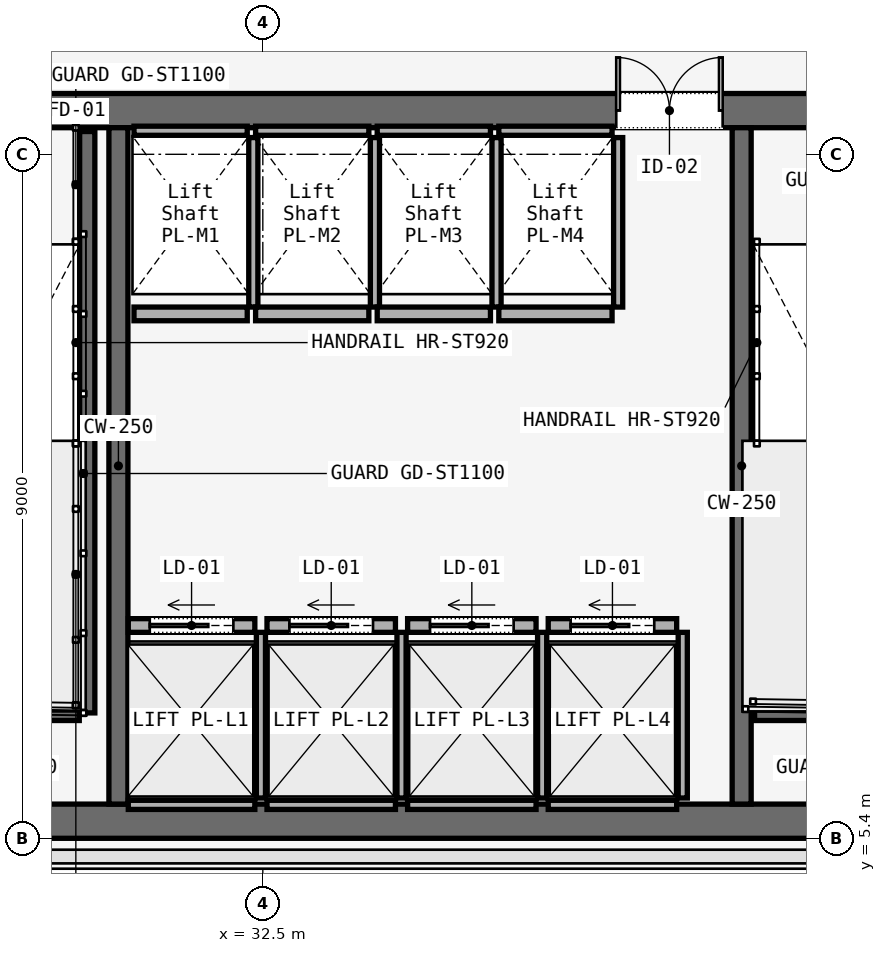
"""IFC4 building model, lengths in metres.
Left out: names, types, materials, properties, quantities, classifications, styles, units other than length and angle.
Written with IfcOpenShell. Run it as: python <this file> out.ifc"""

import sys

from ifc_helpers import new_model, si_unit, direction, frame, frame_2d, origin, place, context, subcontext, project, spatial, rectangle, extrude, element, fill, save


model = new_model("IFC4")
c1 = context("Model", 3, precision=1e-05, world=origin(), true_north=direction((0.0, 1.0)))
c2 = subcontext(c1, "Body", "Model", "MODEL_VIEW")
j1 = project(units=[si_unit("LENGTHUNIT", "METRE"), si_unit("PLANEANGLEUNIT", "RADIAN")], contexts=[c1])
p1 = place(None, origin())
s1 = spatial("IfcSite", under=j1, at=p1, CompositionType="ELEMENT")
p2 = place(p1, origin())
s2 = spatial("IfcBuilding", under=s1, at=p2, CompositionType="ELEMENT")
p3 = place(p2, frame((0.0, 0.0, 77.8)))
s3 = spatial("IfcBuildingStorey", under=s2, at=p3, CompositionType="ELEMENT", Elevation=77.8)
p4 = place(p3, frame((26.45, 14.975, 0.0), z_axis=(0.0, 0.0, 1.0), x_axis=(1.0, 0.0, 0.0)))
e1 = element("IfcWall", 1, at=p4, inside=s3, PredefinedType="SOLIDWALL", context=c2, shape_type="SweptSolid", body=[
    extrude(rectangle(XDim=31.1, YDim=0.45, at=frame_2d((15.55, 0.0))), origin(), (0.0, 0.0, 1.0), 3.58),
])
p5 = place(p4, frame((1.65, 0.0, 0.0)))
e2 = element("IfcOpeningElement", 2, at=p5, cuts=e1, PredefinedType="OPENING", context=c2, shape_type="SweptSolid", body=[
    extrude(rectangle(XDim=1.1, YDim=2.2, at=frame_2d((0.55, 1.1))), frame((0.0, 0.225, 0.0), z_axis=(0.0, -1.0, 0.0), x_axis=(1.0, 0.0, 0.0)), (0.0, 0.0, 1.0), 0.45),
])
p6 = place(p4, frame((13.65, 0.0, 0.0)))
e3 = element("IfcOpeningElement", 3, at=p6, cuts=e1, PredefinedType="OPENING", context=c2, shape_type="SweptSolid", body=[
    extrude(rectangle(XDim=1.1, YDim=2.2, at=frame_2d((0.55, 1.1))), frame((0.0, 0.225, 0.0), z_axis=(0.0, -1.0, 0.0), x_axis=(1.0, 0.0, 0.0)), (0.0, 0.0, 1.0), 0.45),
])
p7 = place(p4, frame((25.55, 0.0, 0.0)))
e4 = element("IfcOpeningElement", 4, at=p7, cuts=e1, PredefinedType="OPENING", context=c2, shape_type="SweptSolid", body=[
    extrude(rectangle(XDim=1.1, YDim=2.2, at=frame_2d((0.55, 1.1))), frame((0.0, 0.225, 0.0), z_axis=(0.0, -1.0, 0.0), x_axis=(1.0, 0.0, 0.0)), (0.0, 0.0, 1.0), 0.45),
])
p8 = place(p4, frame((10.7, 0.0, 0.0)))
e5 = element("IfcOpeningElement", 5, at=p8, cuts=e1, PredefinedType="OPENING", context=c2, shape_type="SweptSolid", body=[
    extrude(rectangle(XDim=1.4, YDim=2.2, at=frame_2d((0.7, 1.1))), frame((0.0, 0.225, 0.0), z_axis=(0.0, -1.0, 0.0), x_axis=(1.0, 0.0, 0.0)), (0.0, 0.0, 1.0), 0.45),
])
p9 = place(p4, frame((19.35, 0.0, 0.0)))
e6 = element("IfcOpeningElement", 6, at=p9, cuts=e1, PredefinedType="OPENING", context=c2, shape_type="SweptSolid", body=[
    extrude(rectangle(XDim=1.1, YDim=2.2, at=frame_2d((0.55, 1.1))), frame((0.0, 0.225, 0.0), z_axis=(0.0, -1.0, 0.0), x_axis=(1.0, 0.0, 0.0)), (0.0, 0.0, 1.0), 0.45),
])
p10 = place(p4, frame((21.4, 0.0, 0.0)))
e7 = element("IfcOpeningElement", 7, at=p10, cuts=e1, PredefinedType="OPENING", context=c2, shape_type="SweptSolid", body=[
    extrude(rectangle(XDim=0.9, YDim=2.1, at=frame_2d((0.45, 1.05))), frame((0.0, 0.225, 0.0), z_axis=(0.0, -1.0, 0.0), x_axis=(1.0, 0.0, 0.0)), (0.0, 0.0, 1.0), 0.45),
])
p11 = place(p4, frame((23.35, 0.0, 0.0)))
e8 = element("IfcOpeningElement", 8, at=p11, cuts=e1, PredefinedType="OPENING", context=c2, shape_type="SweptSolid", body=[
    extrude(rectangle(XDim=1.3, YDim=2.3, at=frame_2d((0.65, 1.15))), frame((0.0, 0.225, 0.0), z_axis=(0.0, -1.0, 0.0), x_axis=(1.0, 0.0, 0.0)), (0.0, 0.0, 1.0), 0.45),
])
p12 = place(p3, frame((26.45, 5.625, 0.0), z_axis=(0.0, 0.0, 1.0), x_axis=(1.0, 0.0, 0.0)))
e9 = element("IfcWall", 9, at=p12, inside=s3, PredefinedType="SOLIDWALL", context=c2, shape_type="SweptSolid", body=[
    extrude(rectangle(XDim=31.1, YDim=0.45, at=frame_2d((15.55, 0.0))), origin(), (0.0, 0.0, 1.0), 3.58),
])
for number, where, z_axis, x_axis in (
    (10, (30.6, 5.85, 0.0), (0.0, 0.0, 1.0), (0.0, 1.0, 0.0)),
    (11, (38.8, 5.85, 0.0), (0.0, 0.0, 1.0), (0.0, 1.0, 0.0)),
):
    element("IfcWall", number, at=place(p3, frame(where, z_axis=z_axis, x_axis=x_axis)), inside=s3, PredefinedType="SOLIDWALL", context=c2, shape_type="SweptSolid", body=[
        extrude(rectangle(XDim=8.9, YDim=0.25, at=frame_2d((4.45, 0.0))), origin(), (0.0, 0.0, 1.0), 3.58),
    ])
p13 = place(p3, frame((30.19, 14.7, 0.0), z_axis=(0.0, 0.0, 1.0), x_axis=(0.0, -1.0, 0.0)))
e12 = element("IfcWall", 12, at=p13, inside=s3, PredefinedType="SOLIDWALL", context=c2, shape_type="SweptSolid", body=[
    extrude(rectangle(XDim=7.65, YDim=0.2, at=frame_2d((3.825, 0.0))), origin(), (0.0, 0.0, 1.0), 3.8),
])
for number, where, z_axis, x_axis in (
    (13, (26.97, 7.05, 0.0), (0.0, 0.0, 1.0), (1.0, 0.0, 0.0)),
    (14, (38.97, 7.05, 0.0), (0.0, 0.0, 1.0), (1.0, 0.0, 0.0)),
):
    element("IfcWall", number, at=place(p3, frame(where, z_axis=z_axis, x_axis=x_axis)), inside=s3, PredefinedType="SOLIDWALL", context=c2, shape_type="SweptSolid", body=[
        extrude(rectangle(XDim=3.115, YDim=0.2, at=frame_2d((1.558, 0.0))), origin(), (0.0, 0.0, 1.0), 3.8),
    ])
p14 = place(p3, frame((30.73, 8.2, 0.0), z_axis=(0.0, 0.0, 1.0), x_axis=(1.0, 0.0, 0.0)))
e15 = element("IfcWall", 15, at=p14, inside=s3, PredefinedType="SOLIDWALL", context=c2, shape_type="SweptSolid", body=[
    extrude(rectangle(XDim=1.665, YDim=0.18, at=frame_2d((0.833, 0.0))), origin(), (0.0, 0.0, 1.0), 2.95),
])
p15 = place(p14, frame((0.282, 0.0, 0.0)))
e16 = element("IfcOpeningElement", 16, at=p15, cuts=e15, PredefinedType="OPENING", context=c2, shape_type="SweptSolid", body=[
    extrude(rectangle(XDim=1.1, YDim=2.2, at=frame_2d((0.55, 1.1))), frame((0.0, 0.09, 0.0), z_axis=(0.0, -1.0, 0.0), x_axis=(1.0, 0.0, 0.0)), (0.0, 0.0, 1.0), 0.18),
])
p16 = place(p3, frame((30.73, 5.84, 0.0), z_axis=(0.0, 0.0, 1.0), x_axis=(1.0, 0.0, 0.0)))
e17 = element("IfcWall", 17, at=p16, inside=s3, PredefinedType="SOLIDWALL", context=c2, shape_type="SweptSolid", body=[
    extrude(rectangle(XDim=1.665, YDim=0.12, at=frame_2d((0.833, 0.0))), origin(), (0.0, 0.0, 1.0), 2.95),
])
p17 = place(p3, frame((32.475, 5.93, 0.0), z_axis=(0.0, 0.0, 1.0), x_axis=(0.0, 1.0, 0.0)))
e18 = element("IfcWall", 18, at=p17, inside=s3, PredefinedType="SOLIDWALL", context=c2, shape_type="SweptSolid", body=[
    extrude(rectangle(XDim=2.18, YDim=0.12, at=frame_2d((1.09, 0.0))), origin(), (0.0, 0.0, 1.0), 2.95),
])
p18 = place(p3, frame((32.555, 8.2, 0.0), z_axis=(0.0, 0.0, 1.0), x_axis=(1.0, 0.0, 0.0)))
e19 = element("IfcWall", 19, at=p18, inside=s3, PredefinedType="SOLIDWALL", context=c2, shape_type="SweptSolid", body=[
    extrude(rectangle(XDim=1.69, YDim=0.18, at=frame_2d((0.845, 0.0))), origin(), (0.0, 0.0, 1.0), 2.95),
])
p19 = place(p18, frame((0.295, 0.0, 0.0)))
e20 = element("IfcOpeningElement", 20, at=p19, cuts=e19, PredefinedType="OPENING", context=c2, shape_type="SweptSolid", body=[
    extrude(rectangle(XDim=1.1, YDim=2.2, at=frame_2d((0.55, 1.1))), frame((0.0, 0.09, 0.0), z_axis=(0.0, -1.0, 0.0), x_axis=(1.0, 0.0, 0.0)), (0.0, 0.0, 1.0), 0.18),
])
p20 = place(p3, frame((32.555, 5.84, 0.0), z_axis=(0.0, 0.0, 1.0), x_axis=(1.0, 0.0, 0.0)))
e21 = element("IfcWall", 21, at=p20, inside=s3, PredefinedType="SOLIDWALL", context=c2, shape_type="SweptSolid", body=[
    extrude(rectangle(XDim=1.69, YDim=0.12, at=frame_2d((0.845, 0.0))), origin(), (0.0, 0.0, 1.0), 2.95),
])
p21 = place(p3, frame((34.325, 5.93, 0.0), z_axis=(0.0, 0.0, 1.0), x_axis=(0.0, 1.0, 0.0)))
e22 = element("IfcWall", 22, at=p21, inside=s3, PredefinedType="SOLIDWALL", context=c2, shape_type="SweptSolid", body=[
    extrude(rectangle(XDim=2.18, YDim=0.12, at=frame_2d((1.09, 0.0))), origin(), (0.0, 0.0, 1.0), 2.95),
])
p22 = place(p3, frame((34.405, 8.2, 0.0), z_axis=(0.0, 0.0, 1.0), x_axis=(1.0, 0.0, 0.0)))
e23 = element("IfcWall", 23, at=p22, inside=s3, PredefinedType="SOLIDWALL", context=c2, shape_type="SweptSolid", body=[
    extrude(rectangle(XDim=1.69, YDim=0.18, at=frame_2d((0.845, 0.0))), origin(), (0.0, 0.0, 1.0), 2.95),
])
p23 = place(p22, frame((0.295, 0.0, 0.0)))
e24 = element("IfcOpeningElement", 24, at=p23, cuts=e23, PredefinedType="OPENING", context=c2, shape_type="SweptSolid", body=[
    extrude(rectangle(XDim=1.1, YDim=2.2, at=frame_2d((0.55, 1.1))), frame((0.0, 0.09, 0.0), z_axis=(0.0, -1.0, 0.0), x_axis=(1.0, 0.0, 0.0)), (0.0, 0.0, 1.0), 0.18),
])
p24 = place(p3, frame((34.405, 5.84, 0.0), z_axis=(0.0, 0.0, 1.0), x_axis=(1.0, 0.0, 0.0)))
e25 = element("IfcWall", 25, at=p24, inside=s3, PredefinedType="SOLIDWALL", context=c2, shape_type="SweptSolid", body=[
    extrude(rectangle(XDim=1.69, YDim=0.12, at=frame_2d((0.845, 0.0))), origin(), (0.0, 0.0, 1.0), 2.95),
])
p25 = place(p3, frame((36.175, 5.93, 0.0), z_axis=(0.0, 0.0, 1.0), x_axis=(0.0, 1.0, 0.0)))
e26 = element("IfcWall", 26, at=p25, inside=s3, PredefinedType="SOLIDWALL", context=c2, shape_type="SweptSolid", body=[
    extrude(rectangle(XDim=2.18, YDim=0.12, at=frame_2d((1.09, 0.0))), origin(), (0.0, 0.0, 1.0), 2.95),
])
p26 = place(p3, frame((36.255, 8.2, 0.0), z_axis=(0.0, 0.0, 1.0), x_axis=(1.0, 0.0, 0.0)))
e27 = element("IfcWall", 27, at=p26, inside=s3, PredefinedType="SOLIDWALL", context=c2, shape_type="SweptSolid", body=[
    extrude(rectangle(XDim=1.69, YDim=0.18, at=frame_2d((0.845, 0.0))), origin(), (0.0, 0.0, 1.0), 2.95),
])
p27 = place(p26, frame((0.295, 0.0, 0.0)))
e28 = element("IfcOpeningElement", 28, at=p27, cuts=e27, PredefinedType="OPENING", context=c2, shape_type="SweptSolid", body=[
    extrude(rectangle(XDim=1.1, YDim=2.2, at=frame_2d((0.55, 1.1))), frame((0.0, 0.09, 0.0), z_axis=(0.0, -1.0, 0.0), x_axis=(1.0, 0.0, 0.0)), (0.0, 0.0, 1.0), 0.18),
])
p28 = place(p3, frame((36.255, 5.84, 0.0), z_axis=(0.0, 0.0, 1.0), x_axis=(1.0, 0.0, 0.0)))
e29 = element("IfcWall", 29, at=p28, inside=s3, PredefinedType="SOLIDWALL", context=c2, shape_type="SweptSolid", body=[
    extrude(rectangle(XDim=1.69, YDim=0.12, at=frame_2d((0.845, 0.0))), origin(), (0.0, 0.0, 1.0), 2.95),
])
p29 = place(p3, frame((38.025, 5.93, 0.0), z_axis=(0.0, 0.0, 1.0), x_axis=(0.0, 1.0, 0.0)))
e30 = element("IfcWall", 30, at=p29, inside=s3, PredefinedType="SOLIDWALL", context=c2, shape_type="SweptSolid", body=[
    extrude(rectangle(XDim=2.18, YDim=0.12, at=frame_2d((1.09, 0.0))), origin(), (0.0, 0.0, 1.0), 2.95),
])
p30 = place(p3, frame((30.805, 12.3, 0.0), z_axis=(0.0, 0.0, 1.0), x_axis=(1.0, 0.0, 0.0)))
e31 = element("IfcWall", 31, at=p30, inside=s3, PredefinedType="SOLIDWALL", context=c2, shape_type="SweptSolid", body=[
    extrude(rectangle(XDim=1.49, YDim=0.18, at=frame_2d((0.745, 0.0))), origin(), (0.0, 0.0, 1.0), 2.95),
])
p31 = place(p3, frame((30.805, 14.71, 0.0), z_axis=(0.0, 0.0, 1.0), x_axis=(1.0, 0.0, 0.0)))
e32 = element("IfcWall", 32, at=p31, inside=s3, PredefinedType="SOLIDWALL", context=c2, shape_type="SweptSolid", body=[
    extrude(rectangle(XDim=1.49, YDim=0.12, at=frame_2d((0.745, 0.0))), origin(), (0.0, 0.0, 1.0), 2.95),
])
p32 = place(p3, frame((32.375, 12.39, 0.0), z_axis=(0.0, 0.0, 1.0), x_axis=(0.0, 1.0, 0.0)))
e33 = element("IfcWall", 33, at=p32, inside=s3, PredefinedType="SOLIDWALL", context=c2, shape_type="SweptSolid", body=[
    extrude(rectangle(XDim=2.23, YDim=0.12, at=frame_2d((1.115, 0.0))), origin(), (0.0, 0.0, 1.0), 2.95),
])
p33 = place(p3, frame((32.405, 12.3, 0.0), z_axis=(0.0, 0.0, 1.0), x_axis=(1.0, 0.0, 0.0)))
e34 = element("IfcWall", 34, at=p33, inside=s3, PredefinedType="SOLIDWALL", context=c2, shape_type="SweptSolid", body=[
    extrude(rectangle(XDim=1.49, YDim=0.18, at=frame_2d((0.745, 0.0))), origin(), (0.0, 0.0, 1.0), 2.95),
])
p34 = place(p3, frame((32.405, 14.71, 0.0), z_axis=(0.0, 0.0, 1.0), x_axis=(1.0, 0.0, 0.0)))
e35 = element("IfcWall", 35, at=p34, inside=s3, PredefinedType="SOLIDWALL", context=c2, shape_type="SweptSolid", body=[
    extrude(rectangle(XDim=1.49, YDim=0.12, at=frame_2d((0.745, 0.0))), origin(), (0.0, 0.0, 1.0), 2.95),
])
p35 = place(p3, frame((33.975, 12.39, 0.0), z_axis=(0.0, 0.0, 1.0), x_axis=(0.0, 1.0, 0.0)))
e36 = element("IfcWall", 36, at=p35, inside=s3, PredefinedType="SOLIDWALL", context=c2, shape_type="SweptSolid", body=[
    extrude(rectangle(XDim=2.23, YDim=0.12, at=frame_2d((1.115, 0.0))), origin(), (0.0, 0.0, 1.0), 2.95),
])
p36 = place(p3, frame((34.005, 12.3, 0.0), z_axis=(0.0, 0.0, 1.0), x_axis=(1.0, 0.0, 0.0)))
e37 = element("IfcWall", 37, at=p36, inside=s3, PredefinedType="SOLIDWALL", context=c2, shape_type="SweptSolid", body=[
    extrude(rectangle(XDim=1.49, YDim=0.18, at=frame_2d((0.745, 0.0))), origin(), (0.0, 0.0, 1.0), 2.95),
])
p37 = place(p3, frame((34.005, 14.71, 0.0), z_axis=(0.0, 0.0, 1.0), x_axis=(1.0, 0.0, 0.0)))
e38 = element("IfcWall", 38, at=p37, inside=s3, PredefinedType="SOLIDWALL", context=c2, shape_type="SweptSolid", body=[
    extrude(rectangle(XDim=1.49, YDim=0.12, at=frame_2d((0.745, 0.0))), origin(), (0.0, 0.0, 1.0), 2.95),
])
p38 = place(p3, frame((35.575, 12.39, 0.0), z_axis=(0.0, 0.0, 1.0), x_axis=(0.0, 1.0, 0.0)))
e39 = element("IfcWall", 39, at=p38, inside=s3, PredefinedType="SOLIDWALL", context=c2, shape_type="SweptSolid", body=[
    extrude(rectangle(XDim=2.23, YDim=0.12, at=frame_2d((1.115, 0.0))), origin(), (0.0, 0.0, 1.0), 2.95),
])
p39 = place(p3, frame((35.605, 12.3, 0.0), z_axis=(0.0, 0.0, 1.0), x_axis=(1.0, 0.0, 0.0)))
e40 = element("IfcWall", 40, at=p39, inside=s3, PredefinedType="SOLIDWALL", context=c2, shape_type="SweptSolid", body=[
    extrude(rectangle(XDim=1.49, YDim=0.18, at=frame_2d((0.745, 0.0))), origin(), (0.0, 0.0, 1.0), 2.95),
])
p40 = place(p3, frame((35.605, 14.71, 0.0), z_axis=(0.0, 0.0, 1.0), x_axis=(1.0, 0.0, 0.0)))
e41 = element("IfcWall", 41, at=p40, inside=s3, PredefinedType="SOLIDWALL", context=c2, shape_type="SweptSolid", body=[
    extrude(rectangle(XDim=1.49, YDim=0.12, at=frame_2d((0.745, 0.0))), origin(), (0.0, 0.0, 1.0), 2.95),
])
p41 = place(p3, frame((37.175, 12.39, 0.0), z_axis=(0.0, 0.0, 1.0), x_axis=(0.0, 1.0, 0.0)))
e42 = element("IfcWall", 42, at=p41, inside=s3, PredefinedType="SOLIDWALL", context=c2, shape_type="SweptSolid", body=[
    extrude(rectangle(XDim=2.23, YDim=0.12, at=frame_2d((1.115, 0.0))), origin(), (0.0, 0.0, 1.0), 2.95),
])
p42 = place(p8, origin())
e43 = element("IfcDoor", 43, at=p42, inside=s3, OperationType="DOUBLE_DOOR_SINGLE_SWING", PredefinedType="DOOR", context=c2, shape_type="SweptSolid", body=[
    extrude(rectangle(XDim=1.4, YDim=2.2, at=frame_2d((0.7, 1.1))), frame((0.0, 0.025, 0.0), z_axis=(0.0, -1.0, 0.0), x_axis=(1.0, 0.0, 0.0)), (0.0, 0.0, 1.0), 0.05),
])
fill(e5, e43)
p43 = place(p15, origin())
e44 = element("IfcDoor", 44, at=p43, inside=s3, OperationType="SLIDING_TO_LEFT", PredefinedType="DOOR", context=c2, shape_type="SweptSolid", body=[
    extrude(rectangle(XDim=1.1, YDim=2.2, at=frame_2d((0.55, 1.1))), frame((0.0, 0.025, 0.0), z_axis=(0.0, -1.0, 0.0), x_axis=(1.0, 0.0, 0.0)), (0.0, 0.0, 1.0), 0.05),
])
fill(e16, e44)
p44 = place(p19, origin())
e45 = element("IfcDoor", 45, at=p44, inside=s3, OperationType="SLIDING_TO_LEFT", PredefinedType="DOOR", context=c2, shape_type="SweptSolid", body=[
    extrude(rectangle(XDim=1.1, YDim=2.2, at=frame_2d((0.55, 1.1))), frame((0.0, 0.025, 0.0), z_axis=(0.0, -1.0, 0.0), x_axis=(1.0, 0.0, 0.0)), (0.0, 0.0, 1.0), 0.05),
])
fill(e20, e45)
p45 = place(p23, origin())
e46 = element("IfcDoor", 46, at=p45, inside=s3, OperationType="SLIDING_TO_LEFT", PredefinedType="DOOR", context=c2, shape_type="SweptSolid", body=[
    extrude(rectangle(XDim=1.1, YDim=2.2, at=frame_2d((0.55, 1.1))), frame((0.0, 0.025, 0.0), z_axis=(0.0, -1.0, 0.0), x_axis=(1.0, 0.0, 0.0)), (0.0, 0.0, 1.0), 0.05),
])
fill(e24, e46)
p46 = place(p27, origin())
e47 = element("IfcDoor", 47, at=p46, inside=s3, OperationType="SLIDING_TO_LEFT", PredefinedType="DOOR", context=c2, shape_type="SweptSolid", body=[
    extrude(rectangle(XDim=1.1, YDim=2.2, at=frame_2d((0.55, 1.1))), frame((0.0, 0.025, 0.0), z_axis=(0.0, -1.0, 0.0), x_axis=(1.0, 0.0, 0.0)), (0.0, 0.0, 1.0), 0.05),
])
fill(e28, e47)
save(model, sys.argv[1])
